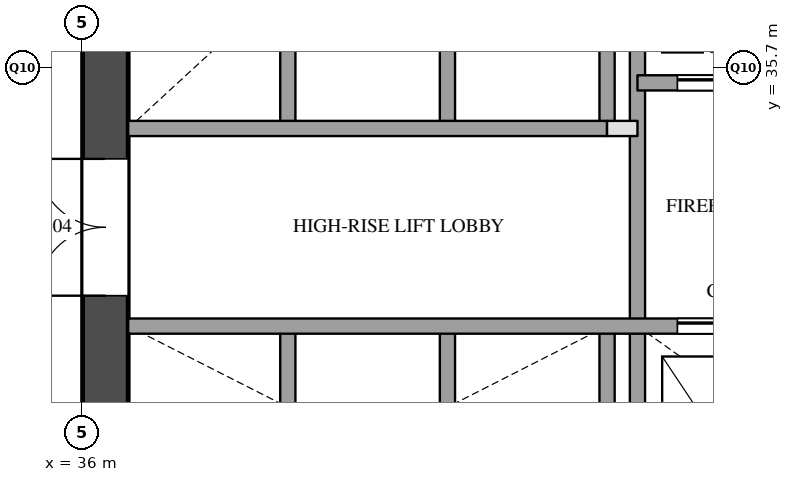
"""IFC4 building model, lengths in metres.
Left out: names, types, materials, properties, quantities, classifications, styles, units other than length and angle.
Written with IfcOpenShell. Run it as: python <this file> out.ifc"""

import sys

from ifc_helpers import new_model, si_unit, direction, frame, frame_2d, origin, place, context, subcontext, project, spatial, rectangle, extrude, element, fill, save


model = new_model("IFC4")
c1 = context("Model", 3, precision=1e-05, world=origin(), true_north=direction((0.0, 1.0)))
c2 = subcontext(c1, "Body", "Model", "MODEL_VIEW")
j1 = project(units=[si_unit("LENGTHUNIT", "METRE"), si_unit("PLANEANGLEUNIT", "RADIAN")], contexts=[c1])
p1 = place(None, origin())
s1 = spatial("IfcSite", under=j1, at=p1, CompositionType="ELEMENT")
p2 = place(p1, origin())
s2 = spatial("IfcBuilding", under=s1, at=p2, CompositionType="ELEMENT")
p3 = place(p2, frame((0.0, 0.0, 46.2)))
s3 = spatial("IfcBuildingStorey", under=s2, at=p3, CompositionType="ELEMENT", Elevation=46.2)
p4 = place(p3, frame((36.3, 29.1, 0.0), z_axis=(0.0, 0.0, 1.0), x_axis=(0.0, 1.0, 0.0)))
e1 = element("IfcWall", 1, at=p4, inside=s3, PredefinedType="SHEAR", context=c2, shape_type="SweptSolid", body=[
    extrude(rectangle(XDim=20.3, YDim=0.6, at=frame_2d((10.15, 0.0))), origin(), (0.0, 0.0, 1.0), 3.5),
])
p5 = place(p4, frame((3.6, 0.0, 0.0)))
e2 = element("IfcOpeningElement", 2, at=p5, cuts=e1, PredefinedType="OPENING", context=c2, shape_type="SweptSolid", body=[
    extrude(rectangle(XDim=1.8, YDim=2.1, at=frame_2d((0.9, 1.05))), frame((0.0, 0.31, 0.0), z_axis=(0.0, -1.0, 0.0), x_axis=(1.0, 0.0, 0.0)), (0.0, 0.0, 1.0), 0.62),
])
p6 = place(p4, frame((16.4, 0.0, 0.0)))
e3 = element("IfcOpeningElement", 3, at=p6, cuts=e1, PredefinedType="OPENING", context=c2, shape_type="SweptSolid", body=[
    extrude(rectangle(XDim=1.0, YDim=2.1, at=frame_2d((0.5, 1.05))), frame((0.0, 0.31, 0.0), z_axis=(0.0, -1.0, 0.0), x_axis=(1.0, 0.0, 0.0)), (0.0, 0.0, 1.0), 0.62),
])
p7 = place(p3, frame((38.7, 29.1, 0.0), z_axis=(0.0, 0.0, 1.0), x_axis=(0.0, 1.0, 0.0)))
e4 = element("IfcWall", 4, at=p7, inside=s3, PredefinedType="SOLIDWALL", context=c2, shape_type="SweptSolid", body=[
    extrude(rectangle(XDim=3.2, YDim=0.2, at=frame_2d((1.6, 0.0))), origin(), (0.0, 0.0, 1.0), 3.5),
])
p8 = place(p3, frame((38.7, 34.9, 0.0), z_axis=(0.0, 0.0, 1.0), x_axis=(0.0, 1.0, 0.0)))
e5 = element("IfcWall", 5, at=p8, inside=s3, PredefinedType="SOLIDWALL", context=c2, shape_type="SweptSolid", body=[
    extrude(rectangle(XDim=3.2, YDim=0.2, at=frame_2d((1.6, 0.0))), origin(), (0.0, 0.0, 1.0), 3.5),
])
p9 = place(p3, frame((40.8, 29.1, 0.0), z_axis=(0.0, 0.0, 1.0), x_axis=(0.0, 1.0, 0.0)))
e6 = element("IfcWall", 6, at=p9, inside=s3, PredefinedType="SOLIDWALL", context=c2, shape_type="SweptSolid", body=[
    extrude(rectangle(XDim=3.2, YDim=0.2, at=frame_2d((1.6, 0.0))), origin(), (0.0, 0.0, 1.0), 3.5),
])
p10 = place(p3, frame((40.8, 34.9, 0.0), z_axis=(0.0, 0.0, 1.0), x_axis=(0.0, 1.0, 0.0)))
e7 = element("IfcWall", 7, at=p10, inside=s3, PredefinedType="SOLIDWALL", context=c2, shape_type="SweptSolid", body=[
    extrude(rectangle(XDim=3.2, YDim=0.2, at=frame_2d((1.6, 0.0))), origin(), (0.0, 0.0, 1.0), 3.5),
])
p11 = place(p3, frame((42.9, 29.1, 0.0), z_axis=(0.0, 0.0, 1.0), x_axis=(0.0, 1.0, 0.0)))
e8 = element("IfcWall", 8, at=p11, inside=s3, PredefinedType="SOLIDWALL", context=c2, shape_type="SweptSolid", body=[
    extrude(rectangle(XDim=3.2, YDim=0.2, at=frame_2d((1.6, 0.0))), origin(), (0.0, 0.0, 1.0), 3.5),
])
p12 = place(p3, frame((42.9, 34.9, 0.0), z_axis=(0.0, 0.0, 1.0), x_axis=(0.0, 1.0, 0.0)))
e9 = element("IfcWall", 9, at=p12, inside=s3, PredefinedType="SOLIDWALL", context=c2, shape_type="SweptSolid", body=[
    extrude(rectangle(XDim=3.2, YDim=0.2, at=frame_2d((1.6, 0.0))), origin(), (0.0, 0.0, 1.0), 3.5),
])
p13 = place(p3, frame((43.3, 29.1, 0.0), z_axis=(0.0, 0.0, 1.0), x_axis=(0.0, 1.0, 0.0)))
e10 = element("IfcWall", 10, at=p13, inside=s3, PredefinedType="SOLIDWALL", context=c2, shape_type="SweptSolid", body=[
    extrude(rectangle(XDim=9.9, YDim=0.2, at=frame_2d((4.95, 0.0))), origin(), (0.0, 0.0, 1.0), 3.5),
])
p14 = place(p3, frame((36.6, 32.3, 0.0), z_axis=(0.0, 0.0, 1.0), x_axis=(1.0, 0.0, 0.0)))
e11 = element("IfcWall", 11, at=p14, inside=s3, PredefinedType="SOLIDWALL", context=c2, shape_type="SweptSolid", body=[
    extrude(rectangle(XDim=11.2, YDim=0.2, at=frame_2d((5.6, 0.0))), origin(), (0.0, 0.0, 1.0), 3.5),
])
p15 = place(p14, frame((7.225, 0.0, 0.0)))
e12 = element("IfcOpeningElement", 12, at=p15, cuts=e11, PredefinedType="OPENING", context=c2, shape_type="SweptSolid", body=[
    extrude(rectangle(XDim=1.2, YDim=2.1, at=frame_2d((0.6, 1.05))), frame((0.0, 0.11, 0.0), z_axis=(0.0, -1.0, 0.0), x_axis=(1.0, 0.0, 0.0)), (0.0, 0.0, 1.0), 0.22),
])
p16 = place(p14, frame((9.475, 0.0, 0.0)))
e13 = element("IfcOpeningElement", 13, at=p16, cuts=e11, PredefinedType="OPENING", context=c2, shape_type="SweptSolid", body=[
    extrude(rectangle(XDim=1.2, YDim=2.1, at=frame_2d((0.6, 1.05))), frame((0.0, 0.11, 0.0), z_axis=(0.0, -1.0, 0.0), x_axis=(1.0, 0.0, 0.0)), (0.0, 0.0, 1.0), 0.22),
])
p17 = place(p3, frame((42.9, 34.9, 0.0), z_axis=(0.0, 0.0, 1.0), x_axis=(1.0, 0.0, 0.0)))
e14 = element("IfcWall", 14, at=p17, inside=s3, PredefinedType="PARTITIONING", context=c2, shape_type="SweptSolid", body=[
    extrude(rectangle(XDim=0.4, YDim=0.2, at=frame_2d((0.2, 0.0))), origin(), (0.0, 0.0, 1.0), 3.5),
])
p18 = place(p3, frame((36.6, 34.9, 0.0), z_axis=(0.0, 0.0, 1.0), x_axis=(1.0, 0.0, 0.0)))
e15 = element("IfcWall", 15, at=p18, inside=s3, PredefinedType="SOLIDWALL", context=c2, shape_type="SweptSolid", body=[
    extrude(rectangle(XDim=6.3, YDim=0.2, at=frame_2d((3.15, 0.0))), origin(), (0.0, 0.0, 1.0), 3.5),
])
p19 = place(p3, frame((43.3, 35.5, 0.0), z_axis=(0.0, 0.0, 1.0), x_axis=(1.0, 0.0, 0.0)))
e16 = element("IfcWall", 16, at=p19, inside=s3, PredefinedType="SOLIDWALL", context=c2, shape_type="SweptSolid", body=[
    extrude(rectangle(XDim=4.5, YDim=0.2, at=frame_2d((2.25, 0.0))), origin(), (0.0, 0.0, 1.0), 3.5),
])
p20 = place(p19, frame((0.525, 0.0, 0.0)))
e17 = element("IfcOpeningElement", 17, at=p20, cuts=e16, PredefinedType="OPENING", context=c2, shape_type="SweptSolid", body=[
    extrude(rectangle(XDim=1.2, YDim=2.1, at=frame_2d((0.6, 1.05))), frame((0.0, 0.11, 0.0), z_axis=(0.0, -1.0, 0.0), x_axis=(1.0, 0.0, 0.0)), (0.0, 0.0, 1.0), 0.22),
])
p21 = place(p19, frame((3.025, 0.0, 0.0)))
e18 = element("IfcOpeningElement", 18, at=p21, cuts=e16, PredefinedType="OPENING", context=c2, shape_type="SweptSolid", body=[
    extrude(rectangle(XDim=0.7, YDim=2.1, at=frame_2d((0.35, 1.05))), frame((0.0, 0.11, 0.0), z_axis=(0.0, -1.0, 0.0), x_axis=(1.0, 0.0, 0.0)), (0.0, 0.0, 1.0), 0.22),
])
p22 = place(p15, origin())
e19 = element("IfcDoor", 19, at=p22, inside=s3, OperationType="SLIDING_TO_LEFT", PredefinedType="DOOR", context=c2, shape_type="SweptSolid", body=[
    extrude(rectangle(XDim=1.2, YDim=2.1, at=frame_2d((0.6, 1.05))), frame((0.0, 0.025, 0.0), z_axis=(0.0, -1.0, 0.0), x_axis=(1.0, 0.0, 0.0)), (0.0, 0.0, 1.0), 0.05),
])
fill(e12, e19)
p23 = place(p20, origin())
e20 = element("IfcDoor", 20, at=p23, inside=s3, OperationType="SLIDING_TO_LEFT", PredefinedType="DOOR", context=c2, shape_type="SweptSolid", body=[
    extrude(rectangle(XDim=1.2, YDim=2.1, at=frame_2d((0.6, 1.05))), frame((0.0, 0.025, 0.0), z_axis=(0.0, -1.0, 0.0), x_axis=(1.0, 0.0, 0.0)), (0.0, 0.0, 1.0), 0.05),
])
fill(e17, e20)
p24 = place(p5, origin())
e21 = element("IfcDoor", 21, at=p24, inside=s3, OperationType="DOUBLE_DOOR_SINGLE_SWING", PredefinedType="DOOR", context=c2, shape_type="SweptSolid", body=[
    extrude(rectangle(XDim=1.8, YDim=2.1, at=frame_2d((0.9, 1.05))), frame((0.0, 0.025, 0.0), z_axis=(0.0, -1.0, 0.0), x_axis=(1.0, 0.0, 0.0)), (0.0, 0.0, 1.0), 0.05),
])
fill(e2, e21)
save(model, sys.argv[1])
